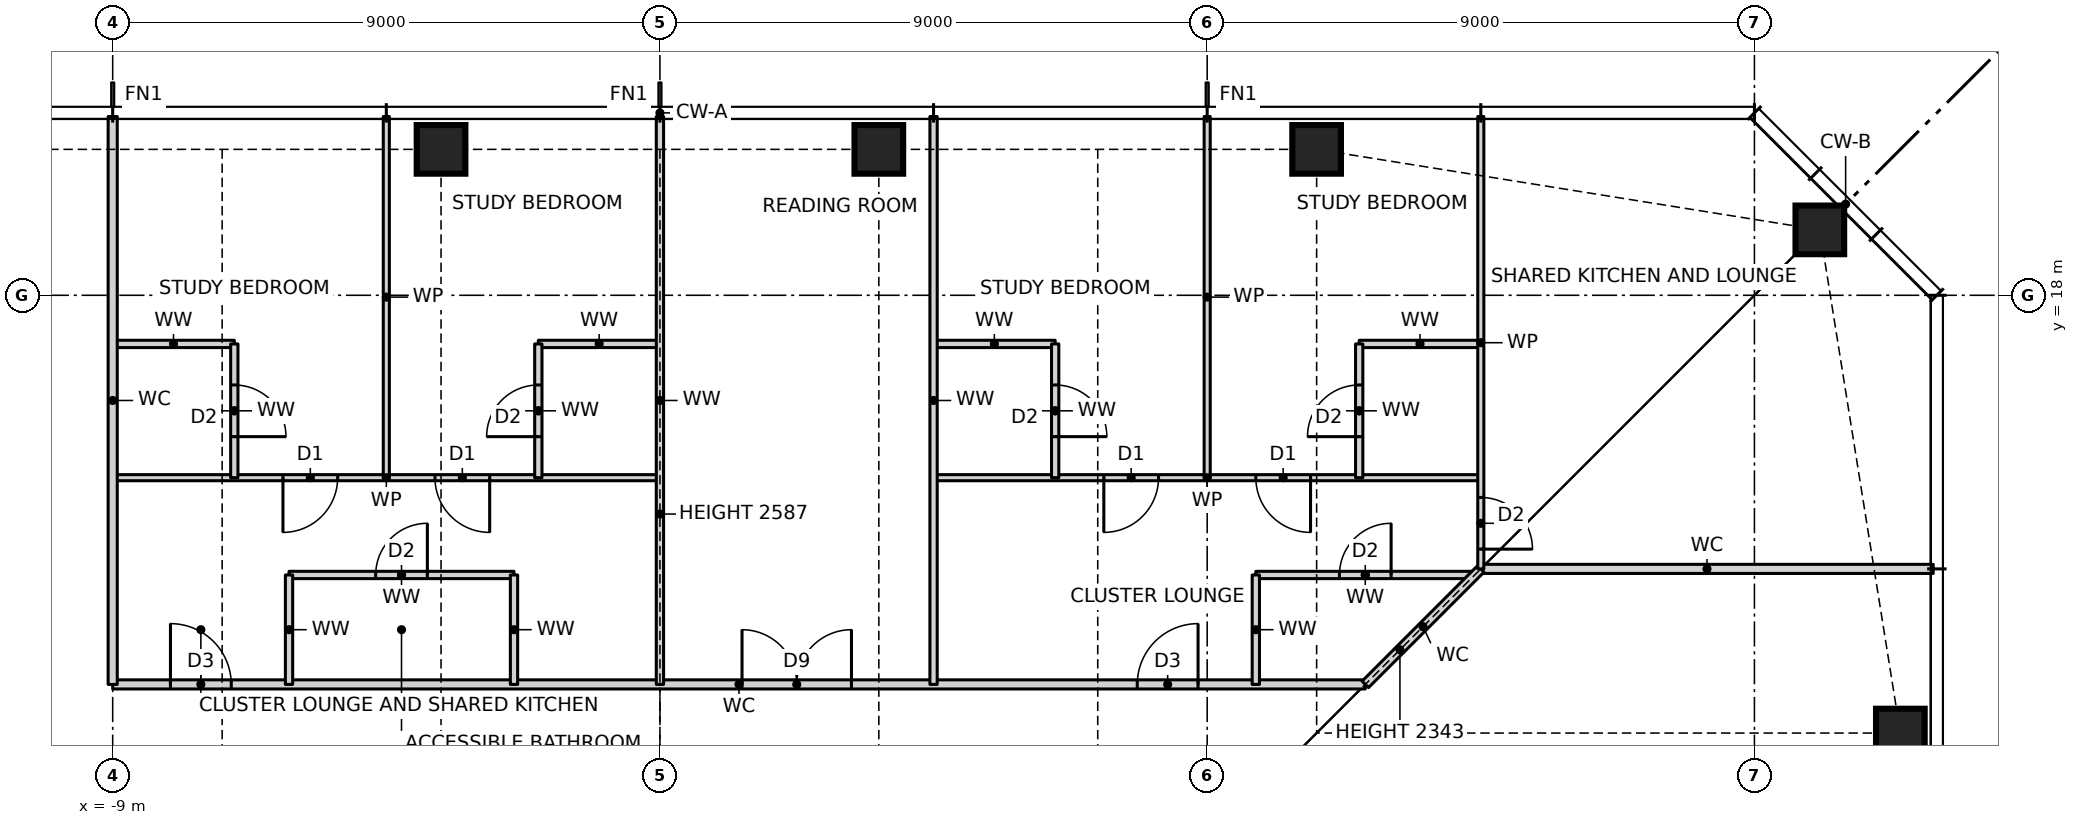
"""IFC4 building model, lengths in metres.
Left out: names, types, materials, properties, quantities, classifications, styles, units other than length and angle.
Written with IfcOpenShell. Run it as: python <this file> out.ifc"""

import sys

from ifc_helpers import new_model, si_unit, direction, frame, frame_2d, origin, origin_2d, place, context, subcontext, project, spatial, rectangle, hollow_rectangle, extrude, element, fill, save


model = new_model("IFC4")
c1 = context("Model", 3, precision=1e-05, world=origin(), true_north=direction((0.0, 1.0)))
c2 = subcontext(c1, "Body", "Model", "MODEL_VIEW")
j1 = project(units=[si_unit("LENGTHUNIT", "METRE"), si_unit("PLANEANGLEUNIT", "RADIAN")], contexts=[c1])
p1 = place(None, origin())
s1 = spatial("IfcSite", under=j1, at=p1, CompositionType="ELEMENT")
p2 = place(p1, origin())
s2 = spatial("IfcBuilding", under=s1, at=p2, CompositionType="ELEMENT")
p3 = place(p2, frame((0.0, 0.0, 105.0)))
s3 = spatial("IfcBuildingStorey", under=s2, at=p3, CompositionType="ELEMENT", Elevation=105.0)
for number, where, z_axis, x_axis in (
    (1, (20.4, 10.8, 0.0), (0.0, 0.0, 1.0), (1.0, 0.0, 0.0)),
    (2, (19.076, 19.076, 0.0), (0.0, 0.0, 1.0), (1.0, 0.0, 0.0)),
    (3, (10.8, 20.4, 0.0), (0.0, 0.0, 1.0), (1.0, 0.0, 0.0)),
    (4, (3.6, 20.4, 0.0), (0.0, 0.0, 1.0), (1.0, 0.0, 0.0)),
    (5, (-3.6, 20.4, 0.0), (0.0, 0.0, 1.0), (1.0, 0.0, 0.0)),
):
    element("IfcColumn", number, at=place(p3, frame(where, z_axis=z_axis, x_axis=x_axis)), inside=s3, PredefinedType="COLUMN", context=c2, shape_type="SweptSolid", body=[
        extrude(hollow_rectangle(XDim=0.8, YDim=0.8, WallThickness=0.07, at=origin_2d()), origin(), (0.0, 0.0, 1.0), 3.5),
    ])
p4 = place(p3, frame((-9.0, 11.6, 0.0), z_axis=(0.0, 0.0, 1.0), x_axis=(1.0, 0.0, 0.0)))
e6 = element("IfcWall", 6, at=p4, inside=s3, PredefinedType="PARTITIONING", context=c2, shape_type="SweptSolid", body=[
    extrude(rectangle(XDim=20.6, YDim=0.15, at=frame_2d((10.3, 0.0))), origin(), (0.0, 0.0, 1.0), 3.27),
])
p5 = place(p4, frame((16.85, 0.0, 0.0)))
e7 = element("IfcOpeningElement", 7, at=p5, cuts=e6, PredefinedType="OPENING", context=c2, shape_type="SweptSolid", body=[
    extrude(rectangle(XDim=1.0, YDim=2.1, at=frame_2d((0.5, 1.05))), frame((0.0, 0.085, 0.0), z_axis=(0.0, -1.0, 0.0), x_axis=(1.0, 0.0, 0.0)), (0.0, 0.0, 1.0), 0.17),
])
p6 = place(p4, frame((10.35, 0.0, 0.0)))
e8 = element("IfcOpeningElement", 8, at=p6, cuts=e6, PredefinedType="OPENING", context=c2, shape_type="SweptSolid", body=[
    extrude(rectangle(XDim=1.8, YDim=2.1, at=frame_2d((0.9, 1.05))), frame((0.0, 0.085, 0.0), z_axis=(0.0, -1.0, 0.0), x_axis=(1.0, 0.0, 0.0)), (0.0, 0.0, 1.0), 0.17),
])
p7 = place(p4, frame((0.95, 0.0, 0.0)))
e9 = element("IfcOpeningElement", 9, at=p7, cuts=e6, PredefinedType="OPENING", context=c2, shape_type="SweptSolid", body=[
    extrude(rectangle(XDim=1.0, YDim=2.1, at=frame_2d((0.5, 1.05))), frame((0.0, 0.085, 0.0), z_axis=(0.0, -1.0, 0.0), x_axis=(1.0, 0.0, 0.0)), (0.0, 0.0, 1.0), 0.17),
])
p8 = place(p3, frame((-6.1, 13.4, 0.0), z_axis=(0.0, 0.0, 1.0), x_axis=(1.0, 0.0, 0.0)))
e10 = element("IfcWall", 10, at=p8, inside=s3, PredefinedType="PARTITIONING", context=c2, shape_type="SweptSolid", body=[
    extrude(rectangle(XDim=3.7, YDim=0.12, at=frame_2d((1.85, 0.0))), origin(), (0.0, 0.0, 1.0), 3.27),
])
p9 = place(p8, frame((1.425, 0.0, 0.0)))
e11 = element("IfcOpeningElement", 11, at=p9, cuts=e10, PredefinedType="OPENING", context=c2, shape_type="SweptSolid", body=[
    extrude(rectangle(XDim=0.85, YDim=2.1, at=frame_2d((0.425, 1.05))), frame((0.0, 0.07, 0.0), z_axis=(0.0, -1.0, 0.0), x_axis=(1.0, 0.0, 0.0)), (0.0, 0.0, 1.0), 0.14),
])
p10 = place(p3, frame((9.8, 13.4, 0.0), z_axis=(0.0, 0.0, 1.0), x_axis=(1.0, 0.0, 0.0)))
e12 = element("IfcWall", 12, at=p10, inside=s3, PredefinedType="PARTITIONING", context=c2, shape_type="SweptSolid", body=[
    extrude(rectangle(XDim=3.6, YDim=0.12, at=frame_2d((1.8, 0.0))), origin(), (0.0, 0.0, 1.0), 3.27),
])
p11 = place(p10, frame((1.375, 0.0, 0.0)))
e13 = element("IfcOpeningElement", 13, at=p11, cuts=e12, PredefinedType="OPENING", context=c2, shape_type="SweptSolid", body=[
    extrude(rectangle(XDim=0.85, YDim=2.1, at=frame_2d((0.425, 1.05))), frame((0.0, 0.07, 0.0), z_axis=(0.0, -1.0, 0.0), x_axis=(1.0, 0.0, 0.0)), (0.0, 0.0, 1.0), 0.14),
])
p12 = place(p3, frame((13.5, 13.5, 0.0), z_axis=(0.0, 0.0, 1.0), x_axis=(1.0, 0.0, 0.0)))
e14 = element("IfcWall", 14, at=p12, inside=s3, PredefinedType="PARTITIONING", context=c2, shape_type="SweptSolid", body=[
    extrude(rectangle(XDim=7.44, YDim=0.15, at=frame_2d((3.72, 0.0))), origin(), (0.0, 0.0, 1.0), 3.27),
])
p13 = place(p3, frame((-9.0, 15.0, 0.0), z_axis=(0.0, 0.0, 1.0), x_axis=(1.0, 0.0, 0.0)))
e15 = element("IfcWall", 15, at=p13, inside=s3, PredefinedType="PARTITIONING", context=c2, shape_type="SweptSolid", body=[
    extrude(rectangle(XDim=9.0, YDim=0.1, at=frame_2d((4.5, 0.0))), origin(), (0.0, 0.0, 1.0), 3.27),
])
p14 = place(p13, frame((5.3, 0.0, 0.0)))
e16 = element("IfcOpeningElement", 16, at=p14, cuts=e15, PredefinedType="OPENING", context=c2, shape_type="SweptSolid", body=[
    extrude(rectangle(XDim=0.9, YDim=2.1, at=frame_2d((0.45, 1.05))), frame((0.0, 0.06, 0.0), z_axis=(0.0, -1.0, 0.0), x_axis=(1.0, 0.0, 0.0)), (0.0, 0.0, 1.0), 0.12),
])
p15 = place(p13, frame((2.8, 0.0, 0.0)))
e17 = element("IfcOpeningElement", 17, at=p15, cuts=e15, PredefinedType="OPENING", context=c2, shape_type="SweptSolid", body=[
    extrude(rectangle(XDim=0.9, YDim=2.1, at=frame_2d((0.45, 1.05))), frame((0.0, 0.06, 0.0), z_axis=(0.0, -1.0, 0.0), x_axis=(1.0, 0.0, 0.0)), (0.0, 0.0, 1.0), 0.12),
])
p16 = place(p3, frame((4.5, 15.0, 0.0), z_axis=(0.0, 0.0, 1.0), x_axis=(1.0, 0.0, 0.0)))
e18 = element("IfcWall", 18, at=p16, inside=s3, PredefinedType="PARTITIONING", context=c2, shape_type="SweptSolid", body=[
    extrude(rectangle(XDim=9.0, YDim=0.1, at=frame_2d((4.5, 0.0))), origin(), (0.0, 0.0, 1.0), 3.27),
])
p17 = place(p16, frame((5.3, 0.0, 0.0)))
e19 = element("IfcOpeningElement", 19, at=p17, cuts=e18, PredefinedType="OPENING", context=c2, shape_type="SweptSolid", body=[
    extrude(rectangle(XDim=0.9, YDim=2.1, at=frame_2d((0.45, 1.05))), frame((0.0, 0.06, 0.0), z_axis=(0.0, -1.0, 0.0), x_axis=(1.0, 0.0, 0.0)), (0.0, 0.0, 1.0), 0.12),
])
p18 = place(p16, frame((2.8, 0.0, 0.0)))
e20 = element("IfcOpeningElement", 20, at=p18, cuts=e18, PredefinedType="OPENING", context=c2, shape_type="SweptSolid", body=[
    extrude(rectangle(XDim=0.9, YDim=2.1, at=frame_2d((0.45, 1.05))), frame((0.0, 0.06, 0.0), z_axis=(0.0, -1.0, 0.0), x_axis=(1.0, 0.0, 0.0)), (0.0, 0.0, 1.0), 0.12),
])
for number, where, z_axis, x_axis in (
    (21, (-9.0, 17.2, 0.0), (0.0, 0.0, 1.0), (1.0, 0.0, 0.0)),
    (22, (-2.0, 17.2, 0.0), (0.0, 0.0, 1.0), (1.0, 0.0, 0.0)),
    (23, (4.5, 17.2, 0.0), (0.0, 0.0, 1.0), (1.0, 0.0, 0.0)),
    (24, (11.5, 17.2, 0.0), (0.0, 0.0, 1.0), (1.0, 0.0, 0.0)),
):
    element("IfcWall", number, at=place(p3, frame(where, z_axis=z_axis, x_axis=x_axis)), inside=s3, PredefinedType="PARTITIONING", context=c2, shape_type="SweptSolid", body=[
        extrude(rectangle(XDim=2.0, YDim=0.12, at=frame_2d((1.0, 0.0))), origin(), (0.0, 0.0, 1.0), 3.27),
    ])
p19 = place(p3, frame((11.6, 11.6, 0.0), z_axis=(0.0, 0.0, 1.0), x_axis=(0.707106781187, 0.707106781187, 0.0)))
e25 = element("IfcWall", 25, at=p19, inside=s3, PredefinedType="PARTITIONING", context=c2, shape_type="SweptSolid", body=[
    extrude(rectangle(XDim=2.687, YDim=0.15, at=frame_2d((1.343, 0.0))), origin(), (0.0, 0.0, 1.0), 2.343),
])
p20 = place(p3, frame((13.5, 13.5, 0.0), z_axis=(0.0, 0.0, 1.0), x_axis=(0.0, 1.0, 0.0)))
e26 = element("IfcWall", 26, at=p20, inside=s3, PredefinedType="PARTITIONING", context=c2, shape_type="SweptSolid", body=[
    extrude(rectangle(XDim=7.44, YDim=0.1, at=frame_2d((3.72, 0.0))), origin(), (0.0, 0.0, 1.0), 3.27),
])
p21 = place(p20, frame((0.325, 0.0, 0.0)))
e27 = element("IfcOpeningElement", 27, at=p21, cuts=e26, PredefinedType="OPENING", context=c2, shape_type="SweptSolid", body=[
    extrude(rectangle(XDim=0.85, YDim=2.1, at=frame_2d((0.425, 1.05))), frame((0.0, 0.06, 0.0), z_axis=(0.0, -1.0, 0.0), x_axis=(1.0, 0.0, 0.0)), (0.0, 0.0, 1.0), 0.12),
])
p22 = place(p3, frame((11.5, 15.0, 0.0), z_axis=(0.0, 0.0, 1.0), x_axis=(0.0, 1.0, 0.0)))
e28 = element("IfcWall", 28, at=p22, inside=s3, PredefinedType="PARTITIONING", context=c2, shape_type="SweptSolid", body=[
    extrude(rectangle(XDim=2.2, YDim=0.12, at=frame_2d((1.1, 0.0))), origin(), (0.0, 0.0, 1.0), 3.27),
])
p23 = place(p22, frame((0.675, 0.0, 0.0)))
e29 = element("IfcOpeningElement", 29, at=p23, cuts=e28, PredefinedType="OPENING", context=c2, shape_type="SweptSolid", body=[
    extrude(rectangle(XDim=0.85, YDim=2.1, at=frame_2d((0.425, 1.05))), frame((0.0, 0.07, 0.0), z_axis=(0.0, -1.0, 0.0), x_axis=(1.0, 0.0, 0.0)), (0.0, 0.0, 1.0), 0.14),
])
p24 = place(p3, frame((9.8, 11.6, 0.0), z_axis=(0.0, 0.0, 1.0), x_axis=(0.0, 1.0, 0.0)))
e30 = element("IfcWall", 30, at=p24, inside=s3, PredefinedType="PARTITIONING", context=c2, shape_type="SweptSolid", body=[
    extrude(rectangle(XDim=1.8, YDim=0.12, at=frame_2d((0.9, 0.0))), origin(), (0.0, 0.0, 1.0), 3.27),
])
p25 = place(p3, frame((9.0, 15.0, 0.0), z_axis=(0.0, 0.0, 1.0), x_axis=(0.0, 1.0, 0.0)))
e31 = element("IfcWall", 31, at=p25, inside=s3, PredefinedType="PARTITIONING", context=c2, shape_type="SweptSolid", body=[
    extrude(rectangle(XDim=5.94, YDim=0.1, at=frame_2d((2.97, 0.0))), origin(), (0.0, 0.0, 1.0), 3.27),
])
p26 = place(p3, frame((6.5, 15.0, 0.0), z_axis=(0.0, 0.0, 1.0), x_axis=(0.0, 1.0, 0.0)))
e32 = element("IfcWall", 32, at=p26, inside=s3, PredefinedType="PARTITIONING", context=c2, shape_type="SweptSolid", body=[
    extrude(rectangle(XDim=2.2, YDim=0.12, at=frame_2d((1.1, 0.0))), origin(), (0.0, 0.0, 1.0), 3.27),
])
p27 = place(p26, frame((0.675, 0.0, 0.0)))
e33 = element("IfcOpeningElement", 33, at=p27, cuts=e32, PredefinedType="OPENING", context=c2, shape_type="SweptSolid", body=[
    extrude(rectangle(XDim=0.85, YDim=2.1, at=frame_2d((0.425, 1.05))), frame((0.0, 0.07, 0.0), z_axis=(0.0, -1.0, 0.0), x_axis=(1.0, 0.0, 0.0)), (0.0, 0.0, 1.0), 0.14),
])
p28 = place(p3, frame((4.5, 11.6, 0.0), z_axis=(0.0, 0.0, 1.0), x_axis=(0.0, 1.0, 0.0)))
e34 = element("IfcWall", 34, at=p28, inside=s3, PredefinedType="PARTITIONING", context=c2, shape_type="SweptSolid", body=[
    extrude(rectangle(XDim=9.34, YDim=0.12, at=frame_2d((4.67, 0.0))), origin(), (0.0, 0.0, 1.0), 3.27),
])
p29 = place(p3, frame((0.0, 11.6, 0.0), z_axis=(0.0, 0.0, 1.0), x_axis=(0.0, 1.0, 0.0)))
e35 = element("IfcWall", 35, at=p29, inside=s3, PredefinedType="PARTITIONING", context=c2, shape_type="SweptSolid", body=[
    extrude(rectangle(XDim=9.34, YDim=0.12, at=frame_2d((4.67, 0.0))), origin(), (0.0, 0.0, 1.0), 2.587),
])
p30 = place(p3, frame((-2.0, 15.0, 0.0), z_axis=(0.0, 0.0, 1.0), x_axis=(0.0, 1.0, 0.0)))
e36 = element("IfcWall", 36, at=p30, inside=s3, PredefinedType="PARTITIONING", context=c2, shape_type="SweptSolid", body=[
    extrude(rectangle(XDim=2.2, YDim=0.12, at=frame_2d((1.1, 0.0))), origin(), (0.0, 0.0, 1.0), 3.27),
])
p31 = place(p30, frame((0.675, 0.0, 0.0)))
e37 = element("IfcOpeningElement", 37, at=p31, cuts=e36, PredefinedType="OPENING", context=c2, shape_type="SweptSolid", body=[
    extrude(rectangle(XDim=0.85, YDim=2.1, at=frame_2d((0.425, 1.05))), frame((0.0, 0.07, 0.0), z_axis=(0.0, -1.0, 0.0), x_axis=(1.0, 0.0, 0.0)), (0.0, 0.0, 1.0), 0.14),
])
p32 = place(p3, frame((-2.4, 11.6, 0.0), z_axis=(0.0, 0.0, 1.0), x_axis=(0.0, 1.0, 0.0)))
e38 = element("IfcWall", 38, at=p32, inside=s3, PredefinedType="PARTITIONING", context=c2, shape_type="SweptSolid", body=[
    extrude(rectangle(XDim=1.8, YDim=0.12, at=frame_2d((0.9, 0.0))), origin(), (0.0, 0.0, 1.0), 3.27),
])
p33 = place(p3, frame((-4.5, 15.0, 0.0), z_axis=(0.0, 0.0, 1.0), x_axis=(0.0, 1.0, 0.0)))
e39 = element("IfcWall", 39, at=p33, inside=s3, PredefinedType="PARTITIONING", context=c2, shape_type="SweptSolid", body=[
    extrude(rectangle(XDim=5.94, YDim=0.1, at=frame_2d((2.97, 0.0))), origin(), (0.0, 0.0, 1.0), 3.27),
])
p34 = place(p3, frame((-6.1, 11.6, 0.0), z_axis=(0.0, 0.0, 1.0), x_axis=(0.0, 1.0, 0.0)))
e40 = element("IfcWall", 40, at=p34, inside=s3, PredefinedType="PARTITIONING", context=c2, shape_type="SweptSolid", body=[
    extrude(rectangle(XDim=1.8, YDim=0.12, at=frame_2d((0.9, 0.0))), origin(), (0.0, 0.0, 1.0), 3.27),
])
p35 = place(p3, frame((-7.0, 15.0, 0.0), z_axis=(0.0, 0.0, 1.0), x_axis=(0.0, 1.0, 0.0)))
e41 = element("IfcWall", 41, at=p35, inside=s3, PredefinedType="PARTITIONING", context=c2, shape_type="SweptSolid", body=[
    extrude(rectangle(XDim=2.2, YDim=0.12, at=frame_2d((1.1, 0.0))), origin(), (0.0, 0.0, 1.0), 3.27),
])
p36 = place(p35, frame((0.675, 0.0, 0.0)))
e42 = element("IfcOpeningElement", 42, at=p36, cuts=e41, PredefinedType="OPENING", context=c2, shape_type="SweptSolid", body=[
    extrude(rectangle(XDim=0.85, YDim=2.1, at=frame_2d((0.425, 1.05))), frame((0.0, 0.07, 0.0), z_axis=(0.0, -1.0, 0.0), x_axis=(1.0, 0.0, 0.0)), (0.0, 0.0, 1.0), 0.14),
])
p37 = place(p3, frame((-9.0, 11.6, 0.0), z_axis=(0.0, 0.0, 1.0), x_axis=(0.0, 1.0, 0.0)))
e43 = element("IfcWall", 43, at=p37, inside=s3, PredefinedType="PARTITIONING", context=c2, shape_type="SweptSolid", body=[
    extrude(rectangle(XDim=9.34, YDim=0.15, at=frame_2d((4.67, 0.0))), origin(), (0.0, 0.0, 1.0), 3.27),
])
p38 = place(p23, origin())
e44 = element("IfcDoor", 44, at=p38, inside=s3, OperationType="SINGLE_SWING_LEFT", PredefinedType="DOOR", context=c2, shape_type="SweptSolid", body=[
    extrude(rectangle(XDim=0.85, YDim=2.1, at=frame_2d((0.425, 1.05))), frame((0.0, 0.025, 0.0), z_axis=(0.0, -1.0, 0.0), x_axis=(1.0, 0.0, 0.0)), (0.0, 0.0, 1.0), 0.05),
])
fill(e29, e44)
p39 = place(p17, frame((0.9, 0.0, 0.0), z_axis=(0.0, 0.0, 1.0), x_axis=(-1.0, 0.0, 0.0)))
e45 = element("IfcDoor", 45, at=p39, inside=s3, OperationType="SINGLE_SWING_LEFT", PredefinedType="DOOR", context=c2, shape_type="SweptSolid", body=[
    extrude(rectangle(XDim=0.9, YDim=2.1, at=frame_2d((0.45, 1.05))), frame((0.0, 0.025, 0.0), z_axis=(0.0, -1.0, 0.0), x_axis=(1.0, 0.0, 0.0)), (0.0, 0.0, 1.0), 0.05),
])
fill(e19, e45)
p40 = place(p27, frame((0.85, 0.0, 0.0), z_axis=(0.0, 0.0, 1.0), x_axis=(-1.0, 0.0, 0.0)))
e46 = element("IfcDoor", 46, at=p40, inside=s3, OperationType="SINGLE_SWING_RIGHT", PredefinedType="DOOR", context=c2, shape_type="SweptSolid", body=[
    extrude(rectangle(XDim=0.85, YDim=2.1, at=frame_2d((0.425, 1.05))), frame((0.0, 0.025, 0.0), z_axis=(0.0, -1.0, 0.0), x_axis=(1.0, 0.0, 0.0)), (0.0, 0.0, 1.0), 0.05),
])
fill(e33, e46)
p41 = place(p18, frame((0.9, 0.0, 0.0), z_axis=(0.0, 0.0, 1.0), x_axis=(-1.0, 0.0, 0.0)))
e47 = element("IfcDoor", 47, at=p41, inside=s3, OperationType="SINGLE_SWING_RIGHT", PredefinedType="DOOR", context=c2, shape_type="SweptSolid", body=[
    extrude(rectangle(XDim=0.9, YDim=2.1, at=frame_2d((0.45, 1.05))), frame((0.0, 0.025, 0.0), z_axis=(0.0, -1.0, 0.0), x_axis=(1.0, 0.0, 0.0)), (0.0, 0.0, 1.0), 0.05),
])
fill(e20, e47)
p42 = place(p5, origin())
e48 = element("IfcDoor", 48, at=p42, inside=s3, OperationType="SINGLE_SWING_RIGHT", PredefinedType="DOOR", context=c2, shape_type="SweptSolid", body=[
    extrude(rectangle(XDim=1.0, YDim=2.1, at=frame_2d((0.5, 1.05))), frame((0.0, 0.025, 0.0), z_axis=(0.0, -1.0, 0.0), x_axis=(1.0, 0.0, 0.0)), (0.0, 0.0, 1.0), 0.05),
])
fill(e7, e48)
p43 = place(p11, origin())
e49 = element("IfcDoor", 49, at=p43, inside=s3, OperationType="SINGLE_SWING_RIGHT", PredefinedType="DOOR", context=c2, shape_type="SweptSolid", body=[
    extrude(rectangle(XDim=0.85, YDim=2.1, at=frame_2d((0.425, 1.05))), frame((0.0, 0.025, 0.0), z_axis=(0.0, -1.0, 0.0), x_axis=(1.0, 0.0, 0.0)), (0.0, 0.0, 1.0), 0.05),
])
fill(e13, e49)
p44 = place(p6, origin())
e50 = element("IfcDoor", 50, at=p44, inside=s3, OperationType="DOUBLE_DOOR_SINGLE_SWING", PredefinedType="DOOR", context=c2, shape_type="SweptSolid", body=[
    extrude(rectangle(XDim=1.8, YDim=2.1, at=frame_2d((0.9, 1.05))), frame((0.0, 0.025, 0.0), z_axis=(0.0, -1.0, 0.0), x_axis=(1.0, 0.0, 0.0)), (0.0, 0.0, 1.0), 0.05),
])
fill(e8, e50)
p45 = place(p31, origin())
e51 = element("IfcDoor", 51, at=p45, inside=s3, OperationType="SINGLE_SWING_LEFT", PredefinedType="DOOR", context=c2, shape_type="SweptSolid", body=[
    extrude(rectangle(XDim=0.85, YDim=2.1, at=frame_2d((0.425, 1.05))), frame((0.0, 0.025, 0.0), z_axis=(0.0, -1.0, 0.0), x_axis=(1.0, 0.0, 0.0)), (0.0, 0.0, 1.0), 0.05),
])
fill(e37, e51)
p46 = place(p14, frame((0.9, 0.0, 0.0), z_axis=(0.0, 0.0, 1.0), x_axis=(-1.0, 0.0, 0.0)))
e52 = element("IfcDoor", 52, at=p46, inside=s3, OperationType="SINGLE_SWING_LEFT", PredefinedType="DOOR", context=c2, shape_type="SweptSolid", body=[
    extrude(rectangle(XDim=0.9, YDim=2.1, at=frame_2d((0.45, 1.05))), frame((0.0, 0.025, 0.0), z_axis=(0.0, -1.0, 0.0), x_axis=(1.0, 0.0, 0.0)), (0.0, 0.0, 1.0), 0.05),
])
fill(e16, e52)
p47 = place(p36, frame((0.85, 0.0, 0.0), z_axis=(0.0, 0.0, 1.0), x_axis=(-1.0, 0.0, 0.0)))
e53 = element("IfcDoor", 53, at=p47, inside=s3, OperationType="SINGLE_SWING_RIGHT", PredefinedType="DOOR", context=c2, shape_type="SweptSolid", body=[
    extrude(rectangle(XDim=0.85, YDim=2.1, at=frame_2d((0.425, 1.05))), frame((0.0, 0.025, 0.0), z_axis=(0.0, -1.0, 0.0), x_axis=(1.0, 0.0, 0.0)), (0.0, 0.0, 1.0), 0.05),
])
fill(e42, e53)
p48 = place(p15, frame((0.9, 0.0, 0.0), z_axis=(0.0, 0.0, 1.0), x_axis=(-1.0, 0.0, 0.0)))
e54 = element("IfcDoor", 54, at=p48, inside=s3, OperationType="SINGLE_SWING_RIGHT", PredefinedType="DOOR", context=c2, shape_type="SweptSolid", body=[
    extrude(rectangle(XDim=0.9, YDim=2.1, at=frame_2d((0.45, 1.05))), frame((0.0, 0.025, 0.0), z_axis=(0.0, -1.0, 0.0), x_axis=(1.0, 0.0, 0.0)), (0.0, 0.0, 1.0), 0.05),
])
fill(e17, e54)
p49 = place(p7, origin())
e55 = element("IfcDoor", 55, at=p49, inside=s3, OperationType="SINGLE_SWING_LEFT", PredefinedType="DOOR", context=c2, shape_type="SweptSolid", body=[
    extrude(rectangle(XDim=1.0, YDim=2.1, at=frame_2d((0.5, 1.05))), frame((0.0, 0.025, 0.0), z_axis=(0.0, -1.0, 0.0), x_axis=(1.0, 0.0, 0.0)), (0.0, 0.0, 1.0), 0.05),
])
fill(e9, e55)
p50 = place(p9, origin())
e56 = element("IfcDoor", 56, at=p50, inside=s3, OperationType="SINGLE_SWING_RIGHT", PredefinedType="DOOR", context=c2, shape_type="SweptSolid", body=[
    extrude(rectangle(XDim=0.85, YDim=2.1, at=frame_2d((0.425, 1.05))), frame((0.0, 0.025, 0.0), z_axis=(0.0, -1.0, 0.0), x_axis=(1.0, 0.0, 0.0)), (0.0, 0.0, 1.0), 0.05),
])
fill(e11, e56)
p51 = place(p21, frame((0.85, 0.0, 0.0), z_axis=(0.0, 0.0, 1.0), x_axis=(-1.0, 0.0, 0.0)))
e57 = element("IfcDoor", 57, at=p51, inside=s3, OperationType="SINGLE_SWING_RIGHT", PredefinedType="DOOR", context=c2, shape_type="SweptSolid", body=[
    extrude(rectangle(XDim=0.85, YDim=2.1, at=frame_2d((0.425, 1.05))), frame((0.0, 0.025, 0.0), z_axis=(0.0, -1.0, 0.0), x_axis=(1.0, 0.0, 0.0)), (0.0, 0.0, 1.0), 0.05),
])
fill(e27, e57)
save(model, sys.argv[1])
